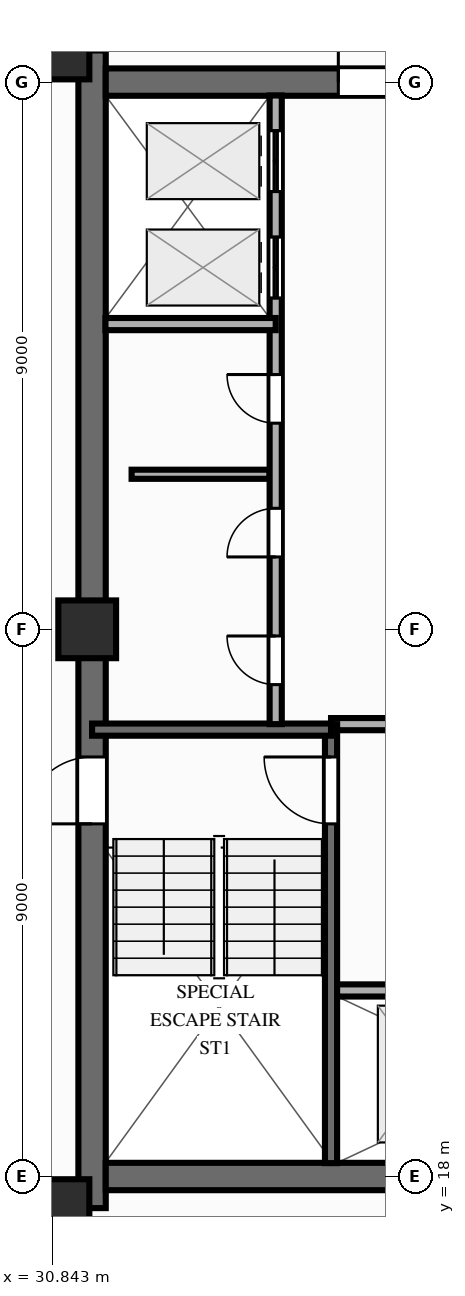
"""IFC4 building model, lengths in metres.
Left out: names, types, materials, properties, quantities, classifications, styles, units other than length and angle.
Written with IfcOpenShell. Run it as: python <this file> out.ifc"""

import sys

from ifc_helpers import new_model, si_unit, direction, frame, frame_2d, origin, origin_2d, place, context, subcontext, project, spatial, rectangle, extrude, source, transform, mapped, element, fill, save


model = new_model("IFC4")
c1 = context("Model", 3, precision=1e-05, world=origin(), true_north=direction((0.0, 1.0)))
c2 = subcontext(c1, "Body", "Model", "MODEL_VIEW")
j1 = project(units=[si_unit("LENGTHUNIT", "METRE"), si_unit("PLANEANGLEUNIT", "RADIAN")], contexts=[c1])
p1 = place(None, origin())
s1 = spatial("IfcSite", under=j1, at=p1, CompositionType="ELEMENT")
p2 = place(p1, origin())
s2 = spatial("IfcBuilding", under=s1, at=p2, CompositionType="ELEMENT")
p3 = place(p2, frame((0.0, 0.0, 246.0)))
s3 = spatial("IfcBuildingStorey", under=s2, at=p3, CompositionType="ELEMENT", Elevation=246.0)
p4 = place(p3, frame((31.5, 17.48, 0.0), z_axis=(0.0, 0.0, 1.0), x_axis=(0.0, 1.0, 0.0)))
e1 = element("IfcWall", 1, at=p4, inside=s3, PredefinedType="SHEAR", context=c2, shape_type="SweptSolid", body=[
    extrude(rectangle(XDim=19.04, YDim=0.45, at=frame_2d((9.52, 0.0))), origin(), (0.0, 0.0, 1.0), 3.0),
])
p5 = place(p4, frame((6.32, 0.0, 0.0)))
e2 = element("IfcOpeningElement", 2, at=p5, cuts=e1, PredefinedType="OPENING", context=c2, shape_type="SweptSolid", body=[
    extrude(rectangle(XDim=1.1, YDim=2.15, at=frame_2d((0.55, 1.075))), frame((0.0, 0.237, 0.0), z_axis=(0.0, -1.0, 0.0), x_axis=(1.0, 0.0, 0.0)), (0.0, 0.0, 1.0), 0.474),
])
p6 = place(p3, frame((31.725, 18.0, 0.0), z_axis=(0.0, 0.0, 1.0), x_axis=(1.0, 0.0, 0.0)))
e3 = element("IfcWall", 3, at=p6, inside=s3, PredefinedType="SHEAR", context=c2, shape_type="SweptSolid", body=[
    extrude(rectangle(XDim=12.55, YDim=0.45, at=frame_2d((6.275, 0.0))), origin(), (0.0, 0.0, 1.0), 3.0),
])
p7 = place(p3, frame((31.725, 36.0, 0.0), z_axis=(0.0, 0.0, 1.0), x_axis=(1.0, 0.0, 0.0)))
e4 = element("IfcWall", 4, at=p7, inside=s3, PredefinedType="SHEAR", context=c2, shape_type="SweptSolid", body=[
    extrude(rectangle(XDim=12.55, YDim=0.45, at=frame_2d((6.275, 0.0))), origin(), (0.0, 0.0, 1.0), 3.0),
])
p8 = place(p7, frame((5.225, 0.0, 0.0), z_axis=(0.0, 0.0, 1.0), x_axis=(-1.0, 0.0, 0.0)))
e5 = element("IfcOpeningElement", 5, at=p8, cuts=e4, PredefinedType="OPENING", context=c2, shape_type="SweptSolid", body=[
    extrude(rectangle(XDim=1.4, YDim=2.15, at=frame_2d((0.7, 1.075))), frame((0.0, 0.237, 0.0), z_axis=(0.0, -1.0, 0.0), x_axis=(1.0, 0.0, 0.0)), (0.0, 0.0, 1.0), 0.474),
])
m1 = source(origin(), c2, "Body", "SweptSolid", [
    extrude(rectangle(XDim=0.95, YDim=0.95, at=origin_2d()), origin(), (0.0, 0.0, 1.0), 3.0),
])
for number, where, z_axis, x_axis in (
    (6, (30.98, 17.48, 0.0), (0.0, 0.0, 1.0), (1.0, 0.0, 0.0)),
    (7, (30.98, 36.52, 0.0), (0.0, 0.0, 1.0), (1.0, 0.0, 0.0)),
    (8, (31.42, 27.0, 0.0), (0.0, 0.0, 1.0), (1.0, 0.0, 0.0)),
):
    element("IfcColumn", number, at=place(p3, frame(where, z_axis=z_axis, x_axis=x_axis)), inside=s3, PredefinedType="COLUMN", context=c2, shape_type="MappedRepresentation", body=[
        mapped(m1, transform((0.0, 0.0, 0.0), scale=1.0)),
    ])
p9 = place(p3, frame((32.15, 29.55, 0.0), z_axis=(0.0, 0.0, 1.0), x_axis=(1.0, 0.0, 0.0)))
e9 = element("IfcWall", 9, at=p9, inside=s3, PredefinedType="PARTITIONING", context=c2, shape_type="SweptSolid", body=[
    extrude(rectangle(XDim=2.27, YDim=0.15, at=frame_2d((1.135, 0.0))), origin(), (0.0, 0.0, 1.0), 2.74),
])
p10 = place(p3, frame((35.43, 21.06, 0.0), z_axis=(0.0, 0.0, 1.0), x_axis=(1.0, 0.0, 0.0)))
e10 = element("IfcWall", 10, at=p10, inside=s3, PredefinedType="PARTITIONING", context=c2, shape_type="SweptSolid", body=[
    extrude(rectangle(XDim=6.02, YDim=0.2, at=frame_2d((3.01, 0.0))), origin(), (0.0, 0.0, 1.0), 2.74),
])
p11 = place(p10, frame((1.0, 0.0, 0.0)))
e11 = element("IfcOpeningElement", 11, at=p11, cuts=e10, PredefinedType="OPENING", context=c2, shape_type="SweptSolid", body=[
    extrude(rectangle(XDim=1.1, YDim=2.15, at=frame_2d((0.55, 1.075))), frame((0.0, 0.112, 0.0), z_axis=(0.0, -1.0, 0.0), x_axis=(1.0, 0.0, 0.0)), (0.0, 0.0, 1.0), 0.224),
])
p12 = place(p10, frame((2.95, 0.0, 0.0)))
e12 = element("IfcOpeningElement", 12, at=p12, cuts=e10, PredefinedType="OPENING", context=c2, shape_type="SweptSolid", body=[
    extrude(rectangle(XDim=1.1, YDim=2.15, at=frame_2d((0.55, 1.075))), frame((0.0, 0.112, 0.0), z_axis=(0.0, -1.0, 0.0), x_axis=(1.0, 0.0, 0.0)), (0.0, 0.0, 1.0), 0.224),
])
p13 = place(p10, frame((4.58, 0.0, 0.0)))
e13 = element("IfcOpeningElement", 13, at=p13, cuts=e10, PredefinedType="OPENING", context=c2, shape_type="SweptSolid", body=[
    extrude(rectangle(XDim=1.2, YDim=2.15, at=frame_2d((0.6, 1.075))), frame((0.0, 0.112, 0.0), z_axis=(0.0, -1.0, 0.0), x_axis=(1.0, 0.0, 0.0)), (0.0, 0.0, 1.0), 0.224),
])
p14 = place(p3, frame((35.43, 25.44, 0.0), z_axis=(0.0, 0.0, 1.0), x_axis=(1.0, 0.0, 0.0)))
e14 = element("IfcWall", 14, at=p14, inside=s3, PredefinedType="PARTITIONING", context=c2, shape_type="SweptSolid", body=[
    extrude(rectangle(XDim=4.72, YDim=0.2, at=frame_2d((2.36, 0.0))), origin(), (0.0, 0.0, 1.0), 2.74),
])
p15 = place(p14, frame((1.25, 0.0, 0.0)))
e15 = element("IfcOpeningElement", 15, at=p15, cuts=e14, PredefinedType="OPENING", context=c2, shape_type="SweptSolid", body=[
    extrude(rectangle(XDim=1.1, YDim=2.15, at=frame_2d((0.55, 1.075))), frame((0.0, 0.112, 0.0), z_axis=(0.0, -1.0, 0.0), x_axis=(1.0, 0.0, 0.0)), (0.0, 0.0, 1.0), 0.224),
])
p16 = place(p3, frame((35.43, 18.22, 0.0), z_axis=(0.0, 0.0, 1.0), x_axis=(0.0, 1.0, 0.0)))
e16 = element("IfcWall", 16, at=p16, inside=s3, PredefinedType="SOLIDWALL", context=c2, shape_type="SweptSolid", body=[
    extrude(rectangle(XDim=7.22, YDim=0.2, at=frame_2d((3.61, 0.0))), origin(), (0.0, 0.0, 1.0), 2.74),
])
p17 = place(p16, frame((6.68, 0.0, 0.0), z_axis=(0.0, 0.0, 1.0), x_axis=(-1.0, 0.0, 0.0)))
e17 = element("IfcOpeningElement", 17, at=p17, cuts=e16, PredefinedType="OPENING", context=c2, shape_type="SweptSolid", body=[
    extrude(rectangle(XDim=1.1, YDim=2.15, at=frame_2d((0.55, 1.075))), frame((0.0, 0.112, 0.0), z_axis=(0.0, -1.0, 0.0), x_axis=(1.0, 0.0, 0.0)), (0.0, 0.0, 1.0), 0.224),
])
p18 = place(p3, frame((31.5, 25.35, 0.0), z_axis=(0.0, 0.0, 1.0), x_axis=(1.0, 0.0, 0.0)))
e18 = element("IfcWall", 18, at=p18, inside=s3, PredefinedType="SOLIDWALL", context=c2, shape_type="SweptSolid", body=[
    extrude(rectangle(XDim=3.93, YDim=0.2, at=frame_2d((1.965, 0.0))), origin(), (0.0, 0.0, 1.0), 2.74),
])
p19 = place(p3, frame((34.52, 25.44, 0.0), z_axis=(0.0, 0.0, 1.0), x_axis=(0.0, 1.0, 0.0)))
e19 = element("IfcWall", 19, at=p19, inside=s3, PredefinedType="PARTITIONING", context=c2, shape_type="SweptSolid", body=[
    extrude(rectangle(XDim=10.34, YDim=0.2, at=frame_2d((5.17, 0.0))), origin(), (0.0, 0.0, 1.0), 2.74),
])
p20 = place(p19, frame((0.65, 0.0, 0.0)))
e20 = element("IfcOpeningElement", 20, at=p20, cuts=e19, PredefinedType="OPENING", context=c2, shape_type="SweptSolid", body=[
    extrude(rectangle(XDim=0.8, YDim=2.05, at=frame_2d((0.4, 1.025))), frame((0.0, 0.112, 0.0), z_axis=(0.0, -1.0, 0.0), x_axis=(1.0, 0.0, 0.0)), (0.0, 0.0, 1.0), 0.224),
])
p21 = place(p19, frame((2.75, 0.0, 0.0)))
e21 = element("IfcOpeningElement", 21, at=p21, cuts=e19, PredefinedType="OPENING", context=c2, shape_type="SweptSolid", body=[
    extrude(rectangle(XDim=0.8, YDim=2.05, at=frame_2d((0.4, 1.025))), frame((0.0, 0.112, 0.0), z_axis=(0.0, -1.0, 0.0), x_axis=(1.0, 0.0, 0.0)), (0.0, 0.0, 1.0), 0.224),
])
p22 = place(p19, frame((4.95, 0.0, 0.0)))
e22 = element("IfcOpeningElement", 22, at=p22, cuts=e19, PredefinedType="OPENING", context=c2, shape_type="SweptSolid", body=[
    extrude(rectangle(XDim=0.8, YDim=2.05, at=frame_2d((0.4, 1.025))), frame((0.0, 0.112, 0.0), z_axis=(0.0, -1.0, 0.0), x_axis=(1.0, 0.0, 0.0)), (0.0, 0.0, 1.0), 0.224),
])
p23 = place(p19, frame((7.01, 0.0, 0.0)))
e23 = element("IfcOpeningElement", 23, at=p23, cuts=e19, PredefinedType="OPENING", context=c2, shape_type="SweptSolid", body=[
    extrude(rectangle(XDim=1.0, YDim=2.15, at=frame_2d((0.5, 1.075))), frame((0.0, 0.112, 0.0), z_axis=(0.0, -1.0, 0.0), x_axis=(1.0, 0.0, 0.0)), (0.0, 0.0, 1.0), 0.224),
])
p24 = place(p19, frame((8.76, 0.0, 0.0)))
e24 = element("IfcOpeningElement", 24, at=p24, cuts=e19, PredefinedType="OPENING", context=c2, shape_type="SweptSolid", body=[
    extrude(rectangle(XDim=1.0, YDim=2.15, at=frame_2d((0.5, 1.075))), frame((0.0, 0.112, 0.0), z_axis=(0.0, -1.0, 0.0), x_axis=(1.0, 0.0, 0.0)), (0.0, 0.0, 1.0), 0.224),
])
p25 = place(p3, frame((31.72, 32.02, 0.0), z_axis=(0.0, 0.0, 1.0), x_axis=(1.0, 0.0, 0.0)))
e25 = element("IfcWall", 25, at=p25, inside=s3, PredefinedType="PARTITIONING", context=c2, shape_type="SweptSolid", body=[
    extrude(rectangle(XDim=2.8, YDim=0.2, at=frame_2d((1.4, 0.0))), origin(), (0.0, 0.0, 1.0), 2.74),
])
m2 = source(origin(), c2, "Body", "SweptSolid", [
    extrude(rectangle(XDim=1.1, YDim=2.15, at=frame_2d((0.55, 1.075))), frame((0.0, 0.025, 0.0), z_axis=(0.0, -1.0, 0.0), x_axis=(1.0, 0.0, 0.0)), (0.0, 0.0, 1.0), 0.05),
])
p26 = place(p5, origin())
e26 = element("IfcDoor", 26, at=p26, inside=s3, OperationType="SINGLE_SWING_LEFT", PredefinedType="DOOR", context=c2, shape_type="MappedRepresentation", body=[
    mapped(m2, transform((0.0, 0.0, 0.0), scale=1.0)),
])
fill(e2, e26)
m3 = source(origin(), c2, "Body", "SweptSolid", [
    extrude(rectangle(XDim=1.4, YDim=2.15, at=frame_2d((0.7, 1.075))), frame((0.0, 0.025, 0.0), z_axis=(0.0, -1.0, 0.0), x_axis=(1.0, 0.0, 0.0)), (0.0, 0.0, 1.0), 0.05),
])
p27 = place(p8, origin())
e27 = element("IfcDoor", 27, at=p27, inside=s3, OperationType="SINGLE_SWING_RIGHT", PredefinedType="DOOR", context=c2, shape_type="MappedRepresentation", body=[
    mapped(m3, transform((0.0, 0.0, 0.0), scale=1.0)),
])
fill(e5, e27)
p28 = place(p17, origin())
e28 = element("IfcDoor", 28, at=p28, inside=s3, OperationType="SINGLE_SWING_LEFT", PredefinedType="DOOR", context=c2, shape_type="MappedRepresentation", body=[
    mapped(m2, transform((0.0, 0.0, 0.0), scale=1.0)),
])
fill(e17, e28)
m4 = source(origin(), c2, "Body", "SweptSolid", [
    extrude(rectangle(XDim=0.8, YDim=2.05, at=frame_2d((0.4, 1.025))), frame((0.0, 0.025, 0.0), z_axis=(0.0, -1.0, 0.0), x_axis=(1.0, 0.0, 0.0)), (0.0, 0.0, 1.0), 0.05),
])
p29 = place(p20, origin())
e29 = element("IfcDoor", 29, at=p29, inside=s3, OperationType="SINGLE_SWING_RIGHT", PredefinedType="DOOR", context=c2, shape_type="MappedRepresentation", body=[
    mapped(m4, transform((0.0, 0.0, 0.0), scale=1.0)),
])
fill(e20, e29)
p30 = place(p21, origin())
e30 = element("IfcDoor", 30, at=p30, inside=s3, OperationType="SINGLE_SWING_LEFT", PredefinedType="DOOR", context=c2, shape_type="MappedRepresentation", body=[
    mapped(m4, transform((0.0, 0.0, 0.0), scale=1.0)),
])
fill(e21, e30)
p31 = place(p22, origin())
e31 = element("IfcDoor", 31, at=p31, inside=s3, OperationType="SINGLE_SWING_RIGHT", PredefinedType="DOOR", context=c2, shape_type="MappedRepresentation", body=[
    mapped(m4, transform((0.0, 0.0, 0.0), scale=1.0)),
])
fill(e22, e31)
m5 = source(origin(), c2, "Body", "SweptSolid", [
    extrude(rectangle(XDim=1.0, YDim=2.15, at=frame_2d((0.5, 1.075))), frame((0.0, 0.025, 0.0), z_axis=(0.0, -1.0, 0.0), x_axis=(1.0, 0.0, 0.0)), (0.0, 0.0, 1.0), 0.05),
])
p32 = place(p23, origin())
e32 = element("IfcDoor", 32, at=p32, inside=s3, OperationType="DOUBLE_DOOR_SLIDING", PredefinedType="DOOR", context=c2, shape_type="MappedRepresentation", body=[
    mapped(m5, transform((0.0, 0.0, 0.0), scale=1.0)),
])
fill(e23, e32)
p33 = place(p24, origin())
e33 = element("IfcDoor", 33, at=p33, inside=s3, OperationType="DOUBLE_DOOR_SLIDING", PredefinedType="DOOR", context=c2, shape_type="MappedRepresentation", body=[
    mapped(m5, transform((0.0, 0.0, 0.0), scale=1.0)),
])
fill(e24, e33)
save(model, sys.argv[1])
